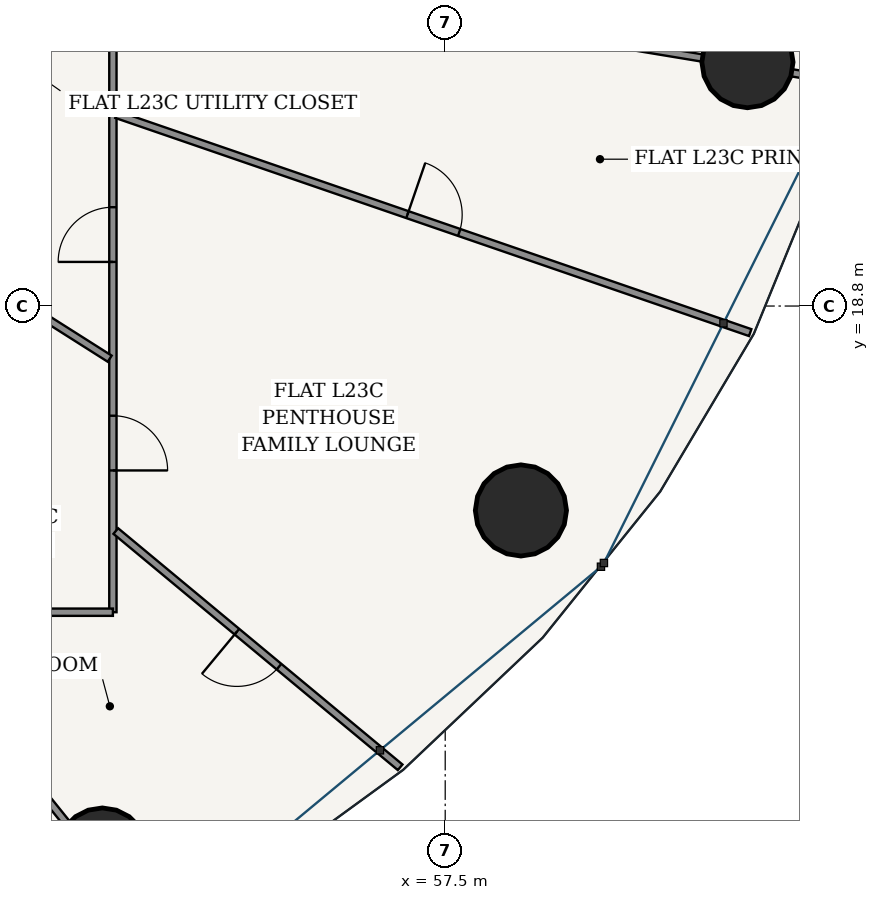
"""IFC4 building model, lengths in metres.
Left out: names, types, materials, properties, quantities, classifications, styles, units other than length and angle.
Written with IfcOpenShell. Run it as: python <this file> out.ifc"""

import sys

from ifc_helpers import new_model, si_unit, direction, frame, frame_2d, origin, origin_2d, place, context, subcontext, project, spatial, rectangle, hollow_circle, extrude, source, transform, mapped, element, fill, save


model = new_model("IFC4")
c1 = context("Model", 3, precision=1e-05, world=origin(), true_north=direction((-0.2419218956, 0.970295726276)))
c2 = subcontext(c1, "Body", "Model", "MODEL_VIEW")
j1 = project(units=[si_unit("LENGTHUNIT", "METRE"), si_unit("PLANEANGLEUNIT", "RADIAN")], contexts=[c1])
p1 = place(None, origin())
s1 = spatial("IfcSite", under=j1, at=p1, CompositionType="ELEMENT")
p2 = place(p1, origin())
s2 = spatial("IfcBuilding", under=s1, at=p2, CompositionType="ELEMENT")
p3 = place(p2, frame((0.0, 0.0, 90.6)))
s3 = spatial("IfcBuildingStorey", under=s2, at=p3, CompositionType="ELEMENT", Elevation=90.6)
for number, where, z_axis, x_axis in (
    (1, (51.862, 9.796, 0.0), (0.0, 0.0, 1.0), (1.0, 0.0, 0.0)),
    (2, (58.745, 15.438, 0.0), (0.0, 0.0, 1.0), (1.0, 0.0, 0.0)),
    (3, (62.471, 22.81, 0.0), (0.0, 0.0, 1.0), (1.0, 0.0, 0.0)),
):
    element("IfcColumn", number, at=place(p3, frame(where, z_axis=z_axis, x_axis=x_axis)), inside=s3, PredefinedType="COLUMN", context=c2, shape_type="SweptSolid", body=[
        extrude(hollow_circle(Radius=0.75, WallThickness=0.045, at=origin_2d()), origin(), (0.0, 0.0, 1.0), 3.6),
    ])
p4 = place(p3, frame((52.035, 34.49, 0.0), z_axis=(0.0, 0.0, 1.0), x_axis=(0.0, -1.0, 0.0)))
e4 = element("IfcWall", 4, at=p4, inside=s3, PredefinedType="PARTITIONING", context=c2, shape_type="SweptSolid", body=[
    extrude(rectangle(XDim=20.725, YDim=0.12, at=frame_2d((10.362, 0.0))), origin(), (0.0, 0.0, 1.0), 2.767),
])
p5 = place(p4, frame((17.493, 0.0, 0.0)))
e5 = element("IfcOpeningElement", 5, at=p5, cuts=e4, PredefinedType="OPENING", context=c2, shape_type="SweptSolid", body=[
    extrude(rectangle(XDim=0.9, YDim=2.15, at=frame_2d((0.45, 1.075))), frame((0.0, 0.07, 0.0), z_axis=(0.0, -1.0, 0.0), x_axis=(1.0, 0.0, 0.0)), (0.0, 0.0, 1.0), 0.14),
])
p6 = place(p4, frame((14.064, 0.0, 0.0)))
e6 = element("IfcOpeningElement", 6, at=p6, cuts=e4, PredefinedType="OPENING", context=c2, shape_type="SweptSolid", body=[
    extrude(rectangle(XDim=0.9, YDim=2.15, at=frame_2d((0.45, 1.075))), frame((0.0, 0.07, 0.0), z_axis=(0.0, -1.0, 0.0), x_axis=(1.0, 0.0, 0.0)), (0.0, 0.0, 1.0), 0.14),
])
p7 = place(p3, frame((52.035, 13.765, 0.0), z_axis=(0.0, 0.0, 1.0), x_axis=(-1.0, 0.0, 0.0)))
e7 = element("IfcWall", 7, at=p7, inside=s3, PredefinedType="PARTITIONING", context=c2, shape_type="SweptSolid", body=[
    extrude(rectangle(XDim=17.054, YDim=0.12, at=frame_2d((8.527, 0.0))), origin(), (0.0, 0.0, 1.0), 2.767),
])
p8 = place(p7, frame((7.203, 0.0, 0.0)))
e8 = element("IfcOpeningElement", 8, at=p8, cuts=e7, PredefinedType="OPENING", context=c2, shape_type="SweptSolid", body=[
    extrude(rectangle(XDim=0.9, YDim=2.15, at=frame_2d((0.45, 1.075))), frame((0.0, 0.07, 0.0), z_axis=(0.0, -1.0, 0.0), x_axis=(1.0, 0.0, 0.0)), (0.0, 0.0, 1.0), 0.14),
])
p9 = place(p3, frame((48.522, 13.717, 0.0), z_axis=(0.0, 0.0, 1.0), x_axis=(0.626707979732, -0.77925419995, 0.0)))
e9 = element("IfcWall", 9, at=p9, inside=s3, PredefinedType="PARTITIONING", context=c2, shape_type="SweptSolid", body=[
    extrude(rectangle(XDim=6.679, YDim=0.12, at=frame_2d((3.339, 0.0))), origin(), (0.0, 0.0, 1.0), 2.767),
])
p10 = place(p3, frame((52.083, 15.1, 0.0), z_axis=(0.0, 0.0, 1.0), x_axis=(0.769161827891, -0.63905405289, 0.0)))
e10 = element("IfcWall", 10, at=p10, inside=s3, PredefinedType="PARTITIONING", context=c2, shape_type="SweptSolid", body=[
    extrude(rectangle(XDim=6.08, YDim=0.12, at=frame_2d((3.04, 0.0))), origin(), (0.0, 0.0, 1.0), 2.767),
])
p11 = place(p10, frame((2.59, 0.0, 0.0)))
e11 = element("IfcOpeningElement", 11, at=p11, cuts=e10, PredefinedType="OPENING", context=c2, shape_type="SweptSolid", body=[
    extrude(rectangle(XDim=0.9, YDim=2.15, at=frame_2d((0.45, 1.075))), frame((0.0, 0.07, 0.0), z_axis=(0.0, -1.0, 0.0), x_axis=(1.0, 0.0, 0.0)), (0.0, 0.0, 1.0), 0.14),
])
p12 = place(p3, frame((52.094, 21.95, 0.0), z_axis=(0.0, 0.0, 1.0), x_axis=(0.945573120726, -0.32540970078, 0.0)))
e12 = element("IfcWall", 12, at=p12, inside=s3, PredefinedType="PARTITIONING", context=c2, shape_type="SweptSolid", body=[
    extrude(rectangle(XDim=11.022, YDim=0.12, at=frame_2d((5.511, 0.0))), origin(), (0.0, 0.0, 1.0), 2.767),
])
p13 = place(p12, frame((5.061, 0.0, 0.0)))
e13 = element("IfcOpeningElement", 13, at=p13, cuts=e12, PredefinedType="OPENING", context=c2, shape_type="SweptSolid", body=[
    extrude(rectangle(XDim=0.9, YDim=2.15, at=frame_2d((0.45, 1.075))), frame((0.0, 0.07, 0.0), z_axis=(0.0, -1.0, 0.0), x_axis=(1.0, 0.0, 0.0)), (0.0, 0.0, 1.0), 0.14),
])
p14 = place(p3, frame((52.096, 24.47, 0.0), z_axis=(0.0, 0.0, 1.0), x_axis=(0.986618264768, -0.163047231274, 0.0)))
e14 = element("IfcWall", 14, at=p14, inside=s3, PredefinedType="PARTITIONING", context=c2, shape_type="SweptSolid", body=[
    extrude(rectangle(XDim=12.039, YDim=0.12, at=frame_2d((6.02, 0.0))), origin(), (0.0, 0.0, 1.0), 2.767),
])
p15 = place(p14, frame((4.496, 0.0, 0.0)))
e15 = element("IfcOpeningElement", 15, at=p15, cuts=e14, PredefinedType="OPENING", context=c2, shape_type="SweptSolid", body=[
    extrude(rectangle(XDim=0.9, YDim=2.15, at=frame_2d((0.45, 1.075))), frame((0.0, 0.07, 0.0), z_axis=(0.0, -1.0, 0.0), x_axis=(1.0, 0.0, 0.0)), (0.0, 0.0, 1.0), 0.14),
])
p16 = place(p3, frame((49.387, 19.58, 0.0), z_axis=(0.0, 0.0, 1.0), x_axis=(0.844540118368, -0.535492286094, 0.0)))
e16 = element("IfcWall", 16, at=p16, inside=s3, PredefinedType="PARTITIONING", context=c2, shape_type="SweptSolid", body=[
    extrude(rectangle(XDim=3.074, YDim=0.12, at=frame_2d((1.537, 0.0))), origin(), (0.0, 0.0, 1.0), 3.325),
])
m1 = source(origin(), c2, "Body", "SweptSolid", [
    extrude(rectangle(XDim=0.9, YDim=2.15, at=frame_2d((0.45, 1.075))), frame((0.0, 0.025, 0.0), z_axis=(0.0, -1.0, 0.0), x_axis=(1.0, 0.0, 0.0)), (0.0, 0.0, 1.0), 0.05),
])
p17 = place(p5, origin())
e17 = element("IfcDoor", 17, at=p17, inside=s3, OperationType="SINGLE_SWING_RIGHT", PredefinedType="DOOR", context=c2, shape_type="MappedRepresentation", body=[
    mapped(m1, transform((0.0, 0.0, 0.0), scale=1.0)),
])
fill(e5, e17)
p18 = place(p6, frame((0.9, 0.0, 0.0), z_axis=(0.0, 0.0, 1.0), x_axis=(-1.0, 0.0, 0.0)))
e18 = element("IfcDoor", 18, at=p18, inside=s3, OperationType="SINGLE_SWING_LEFT", PredefinedType="DOOR", context=c2, shape_type="MappedRepresentation", body=[
    mapped(m1, transform((0.0, 0.0, 0.0), scale=1.0)),
])
fill(e6, e18)
p19 = place(p11, frame((0.9, 0.0, 0.0), z_axis=(0.0, 0.0, 1.0), x_axis=(-1.0, 0.0, 0.0)))
e19 = element("IfcDoor", 19, at=p19, inside=s3, OperationType="SINGLE_SWING_RIGHT", PredefinedType="DOOR", context=c2, shape_type="MappedRepresentation", body=[
    mapped(m1, transform((0.0, 0.0, 0.0), scale=1.0)),
])
fill(e11, e19)
p20 = place(p13, origin())
e20 = element("IfcDoor", 20, at=p20, inside=s3, OperationType="SINGLE_SWING_LEFT", PredefinedType="DOOR", context=c2, shape_type="MappedRepresentation", body=[
    mapped(m1, transform((0.0, 0.0, 0.0), scale=1.0)),
])
fill(e13, e20)
save(model, sys.argv[1])
